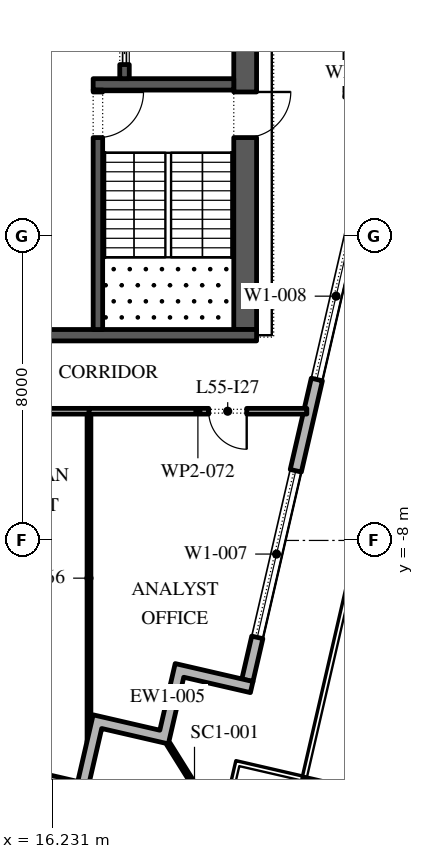
"""IFC4 building model, lengths in metres.
Left out: names, types, materials, properties, quantities, classifications, styles, units other than length and angle.
Written with IfcOpenShell. Run it as: python <this file> out.ifc"""

import sys

from ifc_helpers import new_model, si_unit, direction, frame, frame_2d, origin, origin_2d, place, context, subcontext, project, spatial, polyline, rectangle, outline, extrude, element, fill, save


model = new_model("IFC4")
c1 = context("Model", 3, precision=1e-05, world=origin(), true_north=direction((0.0, 1.0)))
c2 = subcontext(c1, "Body", "Model", "MODEL_VIEW")
j1 = project(units=[si_unit("LENGTHUNIT", "METRE"), si_unit("PLANEANGLEUNIT", "RADIAN")], contexts=[c1])
p1 = place(None, origin())
s1 = spatial("IfcSite", under=j1, at=p1, CompositionType="ELEMENT")
p2 = place(p1, origin())
s2 = spatial("IfcBuilding", under=s1, at=p2, CompositionType="ELEMENT")
p3 = place(p2, frame((0.0, 0.0, 255.6)))
s3 = spatial("IfcBuildingStorey", under=s2, at=p3, CompositionType="ELEMENT", Elevation=255.6)
p4 = place(p3, frame((23.236, -14.883, 0.0), z_axis=(0.0, 0.0, 1.0), x_axis=(0.974370064785, -0.224951054344, 0.0)))
e1 = element("IfcColumn", 1, at=p4, inside=s3, PredefinedType="COLUMN", context=c2, shape_type="SweptSolid", body=[
    extrude(rectangle(XDim=1.1, YDim=1.1, at=origin_2d()), origin(), (0.0, 0.0, 1.0), 4.2),
])
p5 = place(p3, frame((-29.616, -3.758, 0.0), z_axis=(0.0, 0.0, 1.0), x_axis=(0.974370532314, -0.224949029246, 0.0)))
e2 = element("IfcWall", 2, at=p5, inside=s3, PredefinedType="STANDARD", context=c2, shape_type="SweptSolid", body=[
    extrude(rectangle(XDim=48.0, YDim=0.3, at=frame_2d((24.0, 0.0))), origin(), (0.0, 0.0, 1.0), 4.0),
])
p6 = place(p5, frame((1.625, 0.0, 0.45)))
e3 = element("IfcOpeningElement", 3, at=p6, cuts=e2, PredefinedType="OPENING", context=c2, shape_type="SweptSolid", body=[
    extrude(rectangle(XDim=4.5, YDim=3.05, at=frame_2d((2.25, 1.525))), frame((0.0, 0.16, 0.0), z_axis=(0.0, -1.0, 0.0), x_axis=(1.0, 0.0, 0.0)), (0.0, 0.0, 1.0), 0.32),
])
p7 = place(p5, frame((10.575, 0.0, 0.0)))
e4 = element("IfcOpeningElement", 4, at=p7, cuts=e2, PredefinedType="OPENING", context=c2, shape_type="SweptSolid", body=[
    extrude(rectangle(XDim=2.4, YDim=3.5, at=frame_2d((1.2, 1.75))), frame((0.0, 0.16, 0.0), z_axis=(0.0, -1.0, 0.0), x_axis=(1.0, 0.0, 0.0)), (0.0, 0.0, 1.0), 0.32),
])
p8 = place(p5, frame((17.575, 0.0, 0.45)))
e5 = element("IfcOpeningElement", 5, at=p8, cuts=e2, PredefinedType="OPENING", context=c2, shape_type="SweptSolid", body=[
    extrude(rectangle(XDim=4.5, YDim=3.0, at=frame_2d((2.25, 1.5))), frame((0.0, 0.16, 0.0), z_axis=(0.0, -1.0, 0.0), x_axis=(1.0, 0.0, 0.0)), (0.0, 0.0, 1.0), 0.32),
])
p9 = place(p5, frame((25.625, 0.0, 0.45)))
e6 = element("IfcOpeningElement", 6, at=p9, cuts=e2, PredefinedType="OPENING", context=c2, shape_type="SweptSolid", body=[
    extrude(rectangle(XDim=4.5, YDim=3.05, at=frame_2d((2.25, 1.525))), frame((0.0, 0.16, 0.0), z_axis=(0.0, -1.0, 0.0), x_axis=(1.0, 0.0, 0.0)), (0.0, 0.0, 1.0), 0.32),
])
p10 = place(p5, frame((33.675, 0.0, 0.45)))
e7 = element("IfcOpeningElement", 7, at=p10, cuts=e2, PredefinedType="OPENING", context=c2, shape_type="SweptSolid", body=[
    extrude(rectangle(XDim=4.5, YDim=2.825, at=frame_2d((2.25, 1.413))), frame((0.0, 0.16, 0.0), z_axis=(0.0, -1.0, 0.0), x_axis=(1.0, 0.0, 0.0)), (0.0, 0.0, 1.0), 0.32),
])
p11 = place(p5, frame((42.775, 0.0, 0.0)))
e8 = element("IfcOpeningElement", 8, at=p11, cuts=e2, PredefinedType="OPENING", context=c2, shape_type="SweptSolid", body=[
    extrude(rectangle(XDim=2.4, YDim=3.5, at=frame_2d((1.2, 1.75))), frame((0.0, 0.16, 0.0), z_axis=(0.0, -1.0, 0.0), x_axis=(1.0, 0.0, 0.0)), (0.0, 0.0, 1.0), 0.32),
])
p12 = place(p3, frame((21.359, -11.678, 0.0), z_axis=(0.0, 0.0, 1.0), x_axis=(0.224949198343, 0.974370493275, 0.0)))
e9 = element("IfcWall", 9, at=p12, inside=s3, PredefinedType="STANDARD", context=c2, shape_type="SweptSolid", body=[
    extrude(rectangle(XDim=49.5, YDim=0.3, at=frame_2d((24.75, 0.0))), origin(), (0.0, 0.0, 1.0), 4.0),
])
p13 = place(p12, frame((1.157, 0.0, 0.45)))
e10 = element("IfcOpeningElement", 10, at=p13, cuts=e9, PredefinedType="OPENING", context=c2, shape_type="SweptSolid", body=[
    extrude(rectangle(XDim=4.5, YDim=3.05, at=frame_2d((2.25, 1.525))), frame((0.0, 0.16, 0.0), z_axis=(0.0, -1.0, 0.0), x_axis=(1.0, 0.0, 0.0)), (0.0, 0.0, 1.0), 0.32),
])
p14 = place(p12, frame((8.121, 0.0, 0.45)))
e11 = element("IfcOpeningElement", 11, at=p14, cuts=e9, PredefinedType="OPENING", context=c2, shape_type="SweptSolid", body=[
    extrude(rectangle(XDim=4.5, YDim=3.05, at=frame_2d((2.25, 1.525))), frame((0.0, 0.16, 0.0), z_axis=(0.0, -1.0, 0.0), x_axis=(1.0, 0.0, 0.0)), (0.0, 0.0, 1.0), 0.32),
])
p15 = place(p12, frame((15.236, 0.0, 0.45)))
e12 = element("IfcOpeningElement", 12, at=p15, cuts=e9, PredefinedType="OPENING", context=c2, shape_type="SweptSolid", body=[
    extrude(rectangle(XDim=4.5, YDim=3.05, at=frame_2d((2.25, 1.525))), frame((0.0, 0.16, 0.0), z_axis=(0.0, -1.0, 0.0), x_axis=(1.0, 0.0, 0.0)), (0.0, 0.0, 1.0), 0.32),
])
p16 = place(p12, frame((22.35, 0.0, 0.45)))
e13 = element("IfcOpeningElement", 13, at=p16, cuts=e9, PredefinedType="OPENING", context=c2, shape_type="SweptSolid", body=[
    extrude(rectangle(XDim=4.5, YDim=3.05, at=frame_2d((2.25, 1.525))), frame((0.0, 0.16, 0.0), z_axis=(0.0, -1.0, 0.0), x_axis=(1.0, 0.0, 0.0)), (0.0, 0.0, 1.0), 0.32),
])
p17 = place(p12, frame((29.464, 0.0, 0.45)))
e14 = element("IfcOpeningElement", 14, at=p17, cuts=e9, PredefinedType="OPENING", context=c2, shape_type="SweptSolid", body=[
    extrude(rectangle(XDim=4.5, YDim=2.95, at=frame_2d((2.25, 1.475))), frame((0.0, 0.16, 0.0), z_axis=(0.0, -1.0, 0.0), x_axis=(1.0, 0.0, 0.0)), (0.0, 0.0, 1.0), 0.32),
])
p18 = place(p12, frame((37.628, 0.0, 0.0)))
e15 = element("IfcOpeningElement", 15, at=p18, cuts=e9, PredefinedType="OPENING", context=c2, shape_type="SweptSolid", body=[
    extrude(rectangle(XDim=2.4, YDim=3.325, at=frame_2d((1.2, 1.663))), frame((0.0, 0.16, 0.0), z_axis=(0.0, -1.0, 0.0), x_axis=(1.0, 0.0, 0.0)), (0.0, 0.0, 1.0), 0.32),
])
p19 = place(p12, frame((43.693, 0.0, 0.45)))
e16 = element("IfcOpeningElement", 16, at=p19, cuts=e9, PredefinedType="OPENING", context=c2, shape_type="SweptSolid", body=[
    extrude(rectangle(XDim=4.5, YDim=3.05, at=frame_2d((2.25, 1.525))), frame((0.0, 0.16, 0.0), z_axis=(0.0, -1.0, 0.0), x_axis=(1.0, 0.0, 0.0)), (0.0, 0.0, 1.0), 0.32),
])
p20 = place(p3, origin())
e17 = element("IfcWall", 17, at=p20, inside=s3, PredefinedType="STANDARD", context=c2, shape_type="SweptSolid", body=[
    extrude(outline(polyline([(19.054, -12.993), (19.459, -11.24), (21.505, -11.712), (21.438, -12.004), (19.684, -11.599), (19.279, -13.353), (17.525, -12.948), (17.188, -14.41), (16.895, -14.342), (17.3, -12.588), (19.054, -12.993)])), origin(), (0.0, 0.0, 1.0), 4.0),
])
p21 = place(p3, frame((19.279, -13.353, -0.05), z_axis=(0.0, 0.0, 1.0), x_axis=(0.529914407191, -0.848051131154, 0.0)))
e18 = element("IfcWall", 18, at=p21, inside=s3, PredefinedType="STANDARD", context=c2, shape_type="SweptSolid", body=[
    extrude(rectangle(XDim=2.596, YDim=0.1, at=frame_2d((1.298, 0.0))), origin(), (0.0, 0.0, 1.0), 4.05),
])
p22 = place(p3, frame((21.3, -2.45, 0.0), z_axis=(0.0, 0.0, 1.0), x_axis=(0.0, 1.0, 0.0)))
e19 = element("IfcWall", 19, at=p22, inside=s3, PredefinedType="SHEAR", context=c2, shape_type="SweptSolid", body=[
    extrude(rectangle(XDim=27.9, YDim=0.6, at=frame_2d((13.95, 0.0))), origin(), (0.0, 0.0, 1.0), 4.0),
])
p23 = place(p22, frame((5.05, 0.0, 0.0)))
e20 = element("IfcOpeningElement", 20, at=p23, cuts=e19, PredefinedType="OPENING", context=c2, shape_type="SweptSolid", body=[
    extrude(rectangle(XDim=1.2, YDim=2.1, at=frame_2d((0.6, 1.05))), frame((0.0, 0.31, 0.0), z_axis=(0.0, -1.0, 0.0), x_axis=(1.0, 0.0, 0.0)), (0.0, 0.0, 1.0), 0.62),
])
p24 = place(p22, frame((21.65, 0.0, 0.0)))
e21 = element("IfcOpeningElement", 21, at=p24, cuts=e19, PredefinedType="OPENING", context=c2, shape_type="SweptSolid", body=[
    extrude(rectangle(XDim=1.2, YDim=2.1, at=frame_2d((0.6, 1.05))), frame((0.0, 0.31, 0.0), z_axis=(0.0, -1.0, 0.0), x_axis=(1.0, 0.0, 0.0)), (0.0, 0.0, 1.0), 0.62),
])
p25 = place(p3, frame((10.4, -2.6, 0.0), z_axis=(0.0, 0.0, 1.0), x_axis=(1.0, 0.0, 0.0)))
e22 = element("IfcWall", 22, at=p25, inside=s3, PredefinedType="SHEAR", context=c2, shape_type="SweptSolid", body=[
    extrude(rectangle(XDim=11.2, YDim=0.3, at=frame_2d((5.6, 0.0))), origin(), (0.0, 0.0, 1.0), 4.0),
])
p26 = place(p3, frame((17.3, 4.0, 0.0), z_axis=(0.0, 0.0, 1.0), x_axis=(1.0, 0.0, 0.0)))
e23 = element("IfcWall", 23, at=p26, inside=s3, PredefinedType="SHEAR", context=c2, shape_type="SweptSolid", body=[
    extrude(rectangle(XDim=3.7, YDim=0.3, at=frame_2d((1.85, 0.0))), origin(), (0.0, 0.0, 1.0), 4.0),
])
p27 = place(p3, frame((17.425, -2.45, 0.0), z_axis=(0.0, 0.0, 1.0), x_axis=(0.0, 1.0, 0.0)))
e24 = element("IfcWall", 24, at=p27, inside=s3, PredefinedType="SHEAR", context=c2, shape_type="SweptSolid", body=[
    extrude(rectangle(XDim=6.3, YDim=0.25, at=frame_2d((3.15, 0.0))), origin(), (0.0, 0.0, 1.0), 4.0),
])
p28 = place(p27, frame((5.05, 0.0, 0.0)))
e25 = element("IfcOpeningElement", 25, at=p28, cuts=e24, PredefinedType="OPENING", context=c2, shape_type="SweptSolid", body=[
    extrude(rectangle(XDim=1.2, YDim=2.1, at=frame_2d((0.6, 1.05))), frame((0.0, 0.135, 0.0), z_axis=(0.0, -1.0, 0.0), x_axis=(1.0, 0.0, 0.0)), (0.0, 0.0, 1.0), 0.27),
])
p29 = place(p3, frame((18.125, 4.15, 0.0), z_axis=(0.0, 0.0, 1.0), x_axis=(0.0, 1.0, 0.0)))
e26 = element("IfcWall", 26, at=p29, inside=s3, PredefinedType="SHEAR", context=c2, shape_type="SweptSolid", body=[
    extrude(rectangle(XDim=14.7, YDim=0.25, at=frame_2d((7.35, 0.0))), origin(), (0.0, 0.0, 1.0), 4.0),
])
p30 = place(p29, frame((3.246, 0.0, 0.0)))
e27 = element("IfcOpeningElement", 27, at=p30, cuts=e26, PredefinedType="OPENING", context=c2, shape_type="SweptSolid", body=[
    extrude(rectangle(XDim=0.9, YDim=2.1, at=frame_2d((0.45, 1.05))), frame((0.0, 0.135, 0.0), z_axis=(0.0, -1.0, 0.0), x_axis=(1.0, 0.0, 0.0)), (0.0, 0.0, 1.0), 0.27),
])
p31 = place(p29, frame((8.454, 0.0, 0.0)))
e28 = element("IfcOpeningElement", 28, at=p31, cuts=e26, PredefinedType="OPENING", context=c2, shape_type="SweptSolid", body=[
    extrude(rectangle(XDim=0.9, YDim=2.1, at=frame_2d((0.45, 1.05))), frame((0.0, 0.135, 0.0), z_axis=(0.0, -1.0, 0.0), x_axis=(1.0, 0.0, 0.0)), (0.0, 0.0, 1.0), 0.27),
])
p32 = place(p29, frame((0.371, 0.0, 0.0)))
e29 = element("IfcOpeningElement", 29, at=p32, cuts=e26, PredefinedType="OPENING", context=c2, shape_type="SweptSolid", body=[
    extrude(rectangle(XDim=1.1, YDim=2.1, at=frame_2d((0.55, 1.05))), frame((0.0, 0.135, 0.0), z_axis=(0.0, -1.0, 0.0), x_axis=(1.0, 0.0, 0.0)), (0.0, 0.0, 1.0), 0.27),
])
p33 = place(p29, frame((13.229, 0.0, 0.0)))
e30 = element("IfcOpeningElement", 30, at=p33, cuts=e26, PredefinedType="OPENING", context=c2, shape_type="SweptSolid", body=[
    extrude(rectangle(XDim=1.1, YDim=2.1, at=frame_2d((0.55, 1.05))), frame((0.0, 0.135, 0.0), z_axis=(0.0, -1.0, 0.0), x_axis=(1.0, 0.0, 0.0)), (0.0, 0.0, 1.0), 0.27),
])
p34 = place(p3, frame((17.24, -4.6, 0.0), z_axis=(0.0, 0.0, 1.0), x_axis=(-1.0, 0.0, 0.0)))
e31 = element("IfcWall", 31, at=p34, inside=s3, PredefinedType="PARTITIONING", context=c2, shape_type="SweptSolid", body=[
    extrude(rectangle(XDim=7.165, YDim=0.15, at=frame_2d((3.583, 0.0))), origin(), (0.0, 0.0, 1.0), 4.0),
])
p35 = place(p34, frame((4.59, 0.0, 0.0)))
e32 = element("IfcOpeningElement", 32, at=p35, cuts=e31, PredefinedType="OPENING", context=c2, shape_type="SweptSolid", body=[
    extrude(rectangle(XDim=1.0, YDim=2.1, at=frame_2d((0.5, 1.05))), frame((0.0, 0.085, 0.0), z_axis=(0.0, -1.0, 0.0), x_axis=(1.0, 0.0, 0.0)), (0.0, 0.0, 1.0), 0.17),
])
p36 = place(p3, frame((17.19, -4.675, 0.0), z_axis=(0.0, 0.0, 1.0), x_axis=(0.0, -1.0, 0.0)))
e33 = element("IfcWall", 33, at=p36, inside=s3, PredefinedType="PARTITIONING", context=c2, shape_type="SweptSolid", body=[
    extrude(rectangle(XDim=8.635, YDim=0.1, at=frame_2d((4.317, 0.0))), origin(), (0.0, 0.0, 1.0), 4.0),
])
p37 = place(p3, frame((22.922, -4.6, 0.0), z_axis=(0.0, 0.0, 1.0), x_axis=(-1.0, 0.0, 0.0)))
e34 = element("IfcWall", 34, at=p37, inside=s3, PredefinedType="PARTITIONING", context=c2, shape_type="SweptSolid", body=[
    extrude(rectangle(XDim=5.732, YDim=0.15, at=frame_2d((2.866, 0.0))), origin(), (0.0, 0.0, 1.0), 4.0),
])
p38 = place(p37, frame((1.582, 0.0, 0.0)))
e35 = element("IfcOpeningElement", 35, at=p38, cuts=e34, PredefinedType="OPENING", context=c2, shape_type="SweptSolid", body=[
    extrude(rectangle(XDim=1.0, YDim=2.1, at=frame_2d((0.5, 1.05))), frame((0.0, 0.085, 0.0), z_axis=(0.0, -1.0, 0.0), x_axis=(1.0, 0.0, 0.0)), (0.0, 0.0, 1.0), 0.17),
])
p39 = place(p3, frame((23.925, 3.739, 0.0), z_axis=(0.0, 0.0, 1.0), x_axis=(0.993344839434, -0.115178253021, 0.0)))
e36 = element("IfcWall", 36, at=p39, inside=s3, PredefinedType="PARTITIONING", context=c2, shape_type="SweptSolid", body=[
    extrude(rectangle(XDim=0.903, YDim=0.15, at=frame_2d((0.452, 0.0))), origin(), (0.0, 0.0, 1.0), 4.0),
])
p40 = place(p3, frame((24.0, 21.26, 0.0), z_axis=(0.0, 0.0, 1.0), x_axis=(0.0, -1.0, 0.0)))
e37 = element("IfcWall", 37, at=p40, inside=s3, PredefinedType="PARTITIONING", context=c2, shape_type="SweptSolid", body=[
    extrude(rectangle(XDim=17.455, YDim=0.15, at=frame_2d((8.728, 0.0))), origin(), (0.0, 0.0, 1.0), 4.0),
])
p41 = place(p40, frame((11.88, 0.0, 0.0)))
e38 = element("IfcOpeningElement", 38, at=p41, cuts=e37, PredefinedType="OPENING", context=c2, shape_type="SweptSolid", body=[
    extrude(rectangle(XDim=1.0, YDim=2.1, at=frame_2d((0.5, 1.05))), frame((0.0, 0.085, 0.0), z_axis=(0.0, -1.0, 0.0), x_axis=(1.0, 0.0, 0.0)), (0.0, 0.0, 1.0), 0.17),
])
p42 = place(p13, origin())
e39 = element("IfcWindow", 39, at=p42, inside=s3, PartitioningType="DOUBLE_PANEL_VERTICAL", PredefinedType="WINDOW", context=c2, shape_type="SweptSolid", body=[
    extrude(rectangle(XDim=4.5, YDim=3.05, at=frame_2d((2.25, 1.525))), frame((0.0, 0.03, 0.0), z_axis=(0.0, -1.0, 0.0), x_axis=(1.0, 0.0, 0.0)), (0.0, 0.0, 1.0), 0.06),
])
fill(e10, e39)
p43 = place(p14, origin())
e40 = element("IfcWindow", 40, at=p43, inside=s3, PartitioningType="DOUBLE_PANEL_VERTICAL", PredefinedType="WINDOW", context=c2, shape_type="SweptSolid", body=[
    extrude(rectangle(XDim=4.5, YDim=3.05, at=frame_2d((2.25, 1.525))), frame((0.0, 0.03, 0.0), z_axis=(0.0, -1.0, 0.0), x_axis=(1.0, 0.0, 0.0)), (0.0, 0.0, 1.0), 0.06),
])
fill(e11, e40)
p44 = place(p32, origin())
e41 = element("IfcDoor", 41, at=p44, inside=s3, OperationType="SLIDING_TO_LEFT", PredefinedType="DOOR", context=c2, shape_type="SweptSolid", body=[
    extrude(rectangle(XDim=1.1, YDim=2.1, at=frame_2d((0.55, 1.05))), frame((0.0, 0.025, 0.0), z_axis=(0.0, -1.0, 0.0), x_axis=(1.0, 0.0, 0.0)), (0.0, 0.0, 1.0), 0.05),
])
fill(e29, e41)
p45 = place(p28, frame((1.2, 0.0, 0.0), z_axis=(0.0, 0.0, 1.0), x_axis=(-1.0, 0.0, 0.0)))
e42 = element("IfcDoor", 42, at=p45, inside=s3, OperationType="SINGLE_SWING_RIGHT", PredefinedType="DOOR", context=c2, shape_type="SweptSolid", body=[
    extrude(rectangle(XDim=1.2, YDim=2.1, at=frame_2d((0.6, 1.05))), frame((0.0, 0.025, 0.0), z_axis=(0.0, -1.0, 0.0), x_axis=(1.0, 0.0, 0.0)), (0.0, 0.0, 1.0), 0.05),
])
fill(e25, e42)
p46 = place(p23, frame((1.2, 0.0, 0.0), z_axis=(0.0, 0.0, 1.0), x_axis=(-1.0, 0.0, 0.0)))
e43 = element("IfcDoor", 43, at=p46, inside=s3, OperationType="SINGLE_SWING_RIGHT", PredefinedType="DOOR", context=c2, shape_type="SweptSolid", body=[
    extrude(rectangle(XDim=1.2, YDim=2.1, at=frame_2d((0.6, 1.05))), frame((0.0, 0.025, 0.0), z_axis=(0.0, -1.0, 0.0), x_axis=(1.0, 0.0, 0.0)), (0.0, 0.0, 1.0), 0.05),
])
fill(e20, e43)
p47 = place(p38, origin())
e44 = element("IfcDoor", 44, at=p47, inside=s3, OperationType="SINGLE_SWING_RIGHT", PredefinedType="DOOR", context=c2, shape_type="SweptSolid", body=[
    extrude(rectangle(XDim=1.0, YDim=2.1, at=frame_2d((0.5, 1.05))), frame((0.0, 0.025, 0.0), z_axis=(0.0, -1.0, 0.0), x_axis=(1.0, 0.0, 0.0)), (0.0, 0.0, 1.0), 0.05),
])
fill(e35, e44)
save(model, sys.argv[1])
